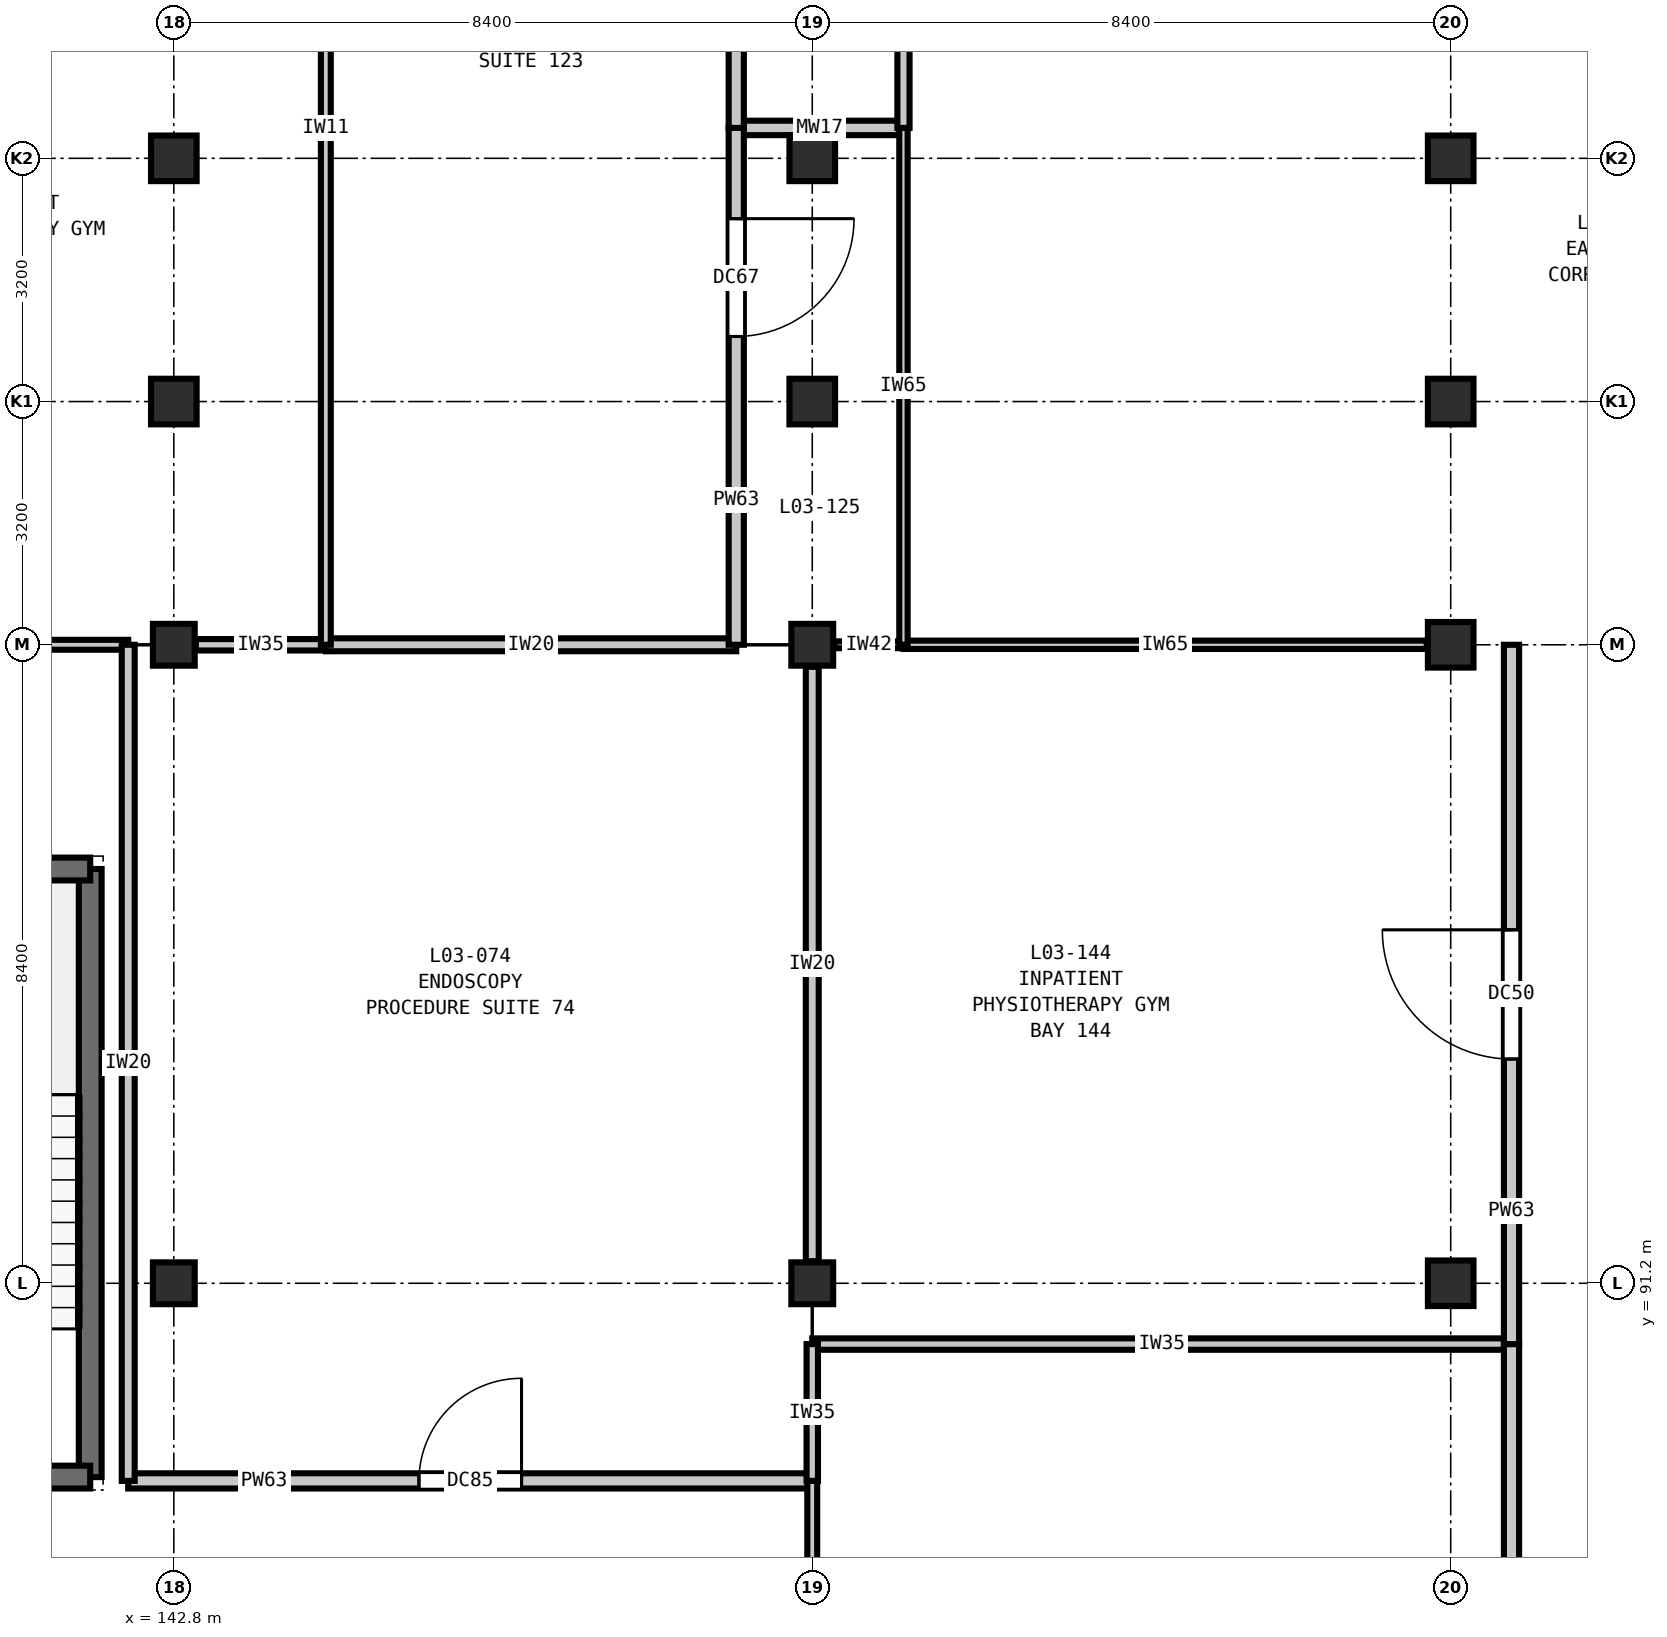
"""IFC4 building model, lengths in metres.
Left out: names, types, materials, properties, quantities, classifications, styles, units other than length and angle.
Written with IfcOpenShell. Run it as: python <this file> out.ifc"""

import sys

from ifc_helpers import new_model, si_unit, direction, frame, frame_2d, origin, origin_2d, place, context, subcontext, project, spatial, rectangle, extrude, element, fill, save


model = new_model("IFC4")
c1 = context("Model", 3, precision=1e-05, world=origin(), true_north=direction((0.0, 1.0)))
c2 = subcontext(c1, "Body", "Model", "MODEL_VIEW")
j1 = project(units=[si_unit("LENGTHUNIT", "METRE"), si_unit("PLANEANGLEUNIT", "RADIAN")], contexts=[c1])
p1 = place(None, origin())
s1 = spatial("IfcSite", under=j1, at=p1, CompositionType="ELEMENT")
p2 = place(p1, origin())
s2 = spatial("IfcBuilding", under=s1, at=p2, CompositionType="ELEMENT")
p3 = place(p2, frame((0.0, 0.0, 16.2)))
s3 = spatial("IfcBuildingStorey", under=s2, at=p3, CompositionType="ELEMENT", Elevation=16.2)
for number, where, z_axis, x_axis in (
    (1, (142.8, 91.2, 0.0), (0.0, 0.0, 1.0), (1.0, 0.0, 0.0)),
    (2, (142.8, 99.6, 0.0), (0.0, 0.0, 1.0), (1.0, 0.0, 0.0)),
):
    element("IfcColumn", number, at=place(p3, frame(where, z_axis=z_axis, x_axis=x_axis)), inside=s3, PredefinedType="COLUMN", context=c2, shape_type="SweptSolid", body=[
        extrude(rectangle(XDim=0.55, YDim=0.55, at=origin_2d()), origin(), (0.0, 0.0, 1.0), 4.2),
    ])
for number, where, z_axis, x_axis in (
    (3, (142.8, 102.8, 0.0), (0.0, 0.0, 1.0), (1.0, 0.0, 0.0)),
    (4, (142.8, 106.0, 0.0), (0.0, 0.0, 1.0), (1.0, 0.0, 0.0)),
):
    element("IfcColumn", number, at=place(p3, frame(where, z_axis=z_axis, x_axis=x_axis)), inside=s3, PredefinedType="COLUMN", context=c2, shape_type="SweptSolid", body=[
        extrude(rectangle(XDim=0.6, YDim=0.6, at=origin_2d()), origin(), (0.0, 0.0, 1.0), 4.2),
    ])
for number, where, z_axis, x_axis in (
    (5, (151.2, 91.2, 0.0), (0.0, 0.0, 1.0), (1.0, 0.0, 0.0)),
    (6, (151.2, 99.6, 0.0), (0.0, 0.0, 1.0), (1.0, 0.0, 0.0)),
):
    element("IfcColumn", number, at=place(p3, frame(where, z_axis=z_axis, x_axis=x_axis)), inside=s3, PredefinedType="COLUMN", context=c2, shape_type="SweptSolid", body=[
        extrude(rectangle(XDim=0.55, YDim=0.55, at=origin_2d()), origin(), (0.0, 0.0, 1.0), 4.2),
    ])
for number, where, z_axis, x_axis in (
    (7, (151.2, 102.8, 0.0), (0.0, 0.0, 1.0), (1.0, 0.0, 0.0)),
    (8, (151.2, 106.0, 0.0), (0.0, 0.0, 1.0), (1.0, 0.0, 0.0)),
    (9, (159.6, 91.2, 0.0), (0.0, 0.0, 1.0), (1.0, 0.0, 0.0)),
    (10, (159.6, 99.6, 0.0), (0.0, 0.0, 1.0), (1.0, 0.0, 0.0)),
    (11, (159.6, 102.8, 0.0), (0.0, 0.0, 1.0), (1.0, 0.0, 0.0)),
    (12, (159.6, 106.0, 0.0), (0.0, 0.0, 1.0), (1.0, 0.0, 0.0)),
):
    element("IfcColumn", number, at=place(p3, frame(where, z_axis=z_axis, x_axis=x_axis)), inside=s3, PredefinedType="COLUMN", context=c2, shape_type="SweptSolid", body=[
        extrude(rectangle(XDim=0.6, YDim=0.6, at=origin_2d()), origin(), (0.0, 0.0, 1.0), 4.2),
    ])
p4 = place(p3, frame((141.7, 88.65, 0.0), z_axis=(0.0, 0.0, 1.0), x_axis=(0.0, 1.0, 0.0)))
e13 = element("IfcWall", 13, at=p4, inside=s3, PredefinedType="SHEAR", context=c2, shape_type="SweptSolid", body=[
    extrude(rectangle(XDim=8.0, YDim=0.3, at=frame_2d((4.0, 0.0))), origin(), (0.0, 0.0, 1.0), 4.2),
])
p5 = place(p3, frame((141.7, 96.65, 0.0), z_axis=(0.0, 0.0, 1.0), x_axis=(-1.0, 0.0, 0.0)))
e14 = element("IfcWall", 14, at=p5, inside=s3, PredefinedType="SHEAR", context=c2, shape_type="SweptSolid", body=[
    extrude(rectangle(XDim=4.1, YDim=0.3, at=frame_2d((2.05, 0.0))), origin(), (0.0, 0.0, 1.0), 4.2),
])
p6 = place(p3, frame((137.6, 88.65, 0.0), z_axis=(0.0, 0.0, 1.0), x_axis=(1.0, 0.0, 0.0)))
e15 = element("IfcWall", 15, at=p6, inside=s3, PredefinedType="SHEAR", context=c2, shape_type="SweptSolid", body=[
    extrude(rectangle(XDim=4.1, YDim=0.3, at=frame_2d((2.05, 0.0))), origin(), (0.0, 0.0, 1.0), 4.2),
])
p7 = place(p6, frame((1.3, 0.0, 0.0)))
e16 = element("IfcOpeningElement", 16, at=p7, cuts=e15, PredefinedType="OPENING", context=c2, shape_type="SweptSolid", body=[
    extrude(rectangle(XDim=1.5, YDim=2.2, at=frame_2d((0.75, 1.1))), frame((0.0, 0.16, 0.0), z_axis=(0.0, -1.0, 0.0), x_axis=(1.0, 0.0, 0.0)), (0.0, 0.0, 1.0), 0.32),
])
p8 = place(p3, frame((142.2, 88.6, 0.0), z_axis=(0.0, 0.0, 1.0), x_axis=(1.0, 0.0, 0.0)))
e17 = element("IfcWall", 17, at=p8, inside=s3, PredefinedType="PARTITIONING", context=c2, shape_type="SweptSolid", body=[
    extrude(rectangle(XDim=9.0, YDim=0.2, at=frame_2d((4.5, 0.0))), origin(), (0.0, 0.0, 1.0), 3.89),
])
p9 = place(p8, frame((3.825, 0.0, 0.0)))
e18 = element("IfcOpeningElement", 18, at=p9, cuts=e17, PredefinedType="OPENING", context=c2, shape_type="SweptSolid", body=[
    extrude(rectangle(XDim=1.35, YDim=2.2, at=frame_2d((0.675, 1.1))), frame((0.0, 0.11, 0.0), z_axis=(0.0, -1.0, 0.0), x_axis=(1.0, 0.0, 0.0)), (0.0, 0.0, 1.0), 0.22),
])
p10 = place(p3, frame((151.2, 90.4, 0.0), z_axis=(0.0, 0.0, 1.0), x_axis=(1.0, 0.0, 0.0)))
e19 = element("IfcWall", 19, at=p10, inside=s3, PredefinedType="PARTITIONING", context=c2, shape_type="SweptSolid", body=[
    extrude(rectangle(XDim=9.2, YDim=0.15, at=frame_2d((4.6, 0.0))), origin(), (0.0, 0.0, 1.0), 3.89),
])
p11 = place(p3, frame((136.4, 99.6, 0.0), z_axis=(0.0, 0.0, 1.0), x_axis=(1.0, 0.0, 0.0)))
e20 = element("IfcWall", 20, at=p11, inside=s3, PredefinedType="PARTITIONING", context=c2, shape_type="SweptSolid", body=[
    extrude(rectangle(XDim=5.8, YDim=0.13, at=frame_2d((2.9, 0.0))), origin(), (0.0, 0.0, 1.0), 3.535),
])
p12 = place(p3, frame((143.09, 99.6, 0.0), z_axis=(0.0, 0.0, 1.0), x_axis=(1.0, 0.0, 0.0)))
e21 = element("IfcWall", 21, at=p12, inside=s3, PredefinedType="PARTITIONING", context=c2, shape_type="SweptSolid", body=[
    extrude(rectangle(XDim=1.71, YDim=0.15, at=frame_2d((0.855, 0.0))), origin(), (0.0, 0.0, 1.0), 3.535),
])
p13 = place(p3, frame((144.8, 99.6, 0.0), z_axis=(0.0, 0.0, 1.0), x_axis=(1.0, 0.0, 0.0)))
e22 = element("IfcWall", 22, at=p13, inside=s3, PredefinedType="PARTITIONING", context=c2, shape_type="SweptSolid", body=[
    extrude(rectangle(XDim=5.4, YDim=0.17, at=frame_2d((2.7, 0.0))), origin(), (0.0, 0.0, 1.0), 3.535),
])
p14 = place(p3, frame((151.49, 99.6, 0.0), z_axis=(0.0, 0.0, 1.0), x_axis=(1.0, 0.0, 0.0)))
e23 = element("IfcWall", 23, at=p14, inside=s3, PredefinedType="PARTITIONING", context=c2, shape_type="SweptSolid", body=[
    extrude(rectangle(XDim=0.91, YDim=0.09, at=frame_2d((0.455, 0.0))), origin(), (0.0, 0.0, 1.0), 3.535),
])
p15 = place(p3, frame((152.4, 99.6, 0.0), z_axis=(0.0, 0.0, 1.0), x_axis=(1.0, 0.0, 0.0)))
e24 = element("IfcWall", 24, at=p15, inside=s3, PredefinedType="PARTITIONING", context=c2, shape_type="SweptSolid", body=[
    extrude(rectangle(XDim=6.885, YDim=0.11, at=frame_2d((3.442, 0.0))), origin(), (0.0, 0.0, 1.0), 3.535),
])
p16 = place(p3, frame((150.2, 106.4, 0.0), z_axis=(0.0, 0.0, 1.0), x_axis=(1.0, 0.0, 0.0)))
e25 = element("IfcWall", 25, at=p16, inside=s3, PredefinedType="PLUMBINGWALL", context=c2, shape_type="SweptSolid", body=[
    extrude(rectangle(XDim=2.2, YDim=0.19, at=frame_2d((1.1, 0.0))), origin(), (0.0, 0.0, 1.0), 3.89),
])
p17 = place(p3, frame((142.2, 88.6, 0.0), z_axis=(0.0, 0.0, 1.0), x_axis=(0.0, 1.0, 0.0)))
e26 = element("IfcWall", 26, at=p17, inside=s3, PredefinedType="PARTITIONING", context=c2, shape_type="SweptSolid", body=[
    extrude(rectangle(XDim=11.0, YDim=0.17, at=frame_2d((5.5, 0.0))), origin(), (0.0, 0.0, 1.0), 3.89),
])
p18 = place(p3, frame((144.8, 99.6, 0.0), z_axis=(0.0, 0.0, 1.0), x_axis=(0.0, 1.0, 0.0)))
e27 = element("IfcWall", 27, at=p18, inside=s3, PredefinedType="PARTITIONING", context=c2, shape_type="SweptSolid", body=[
    extrude(rectangle(XDim=13.6, YDim=0.13, at=frame_2d((6.8, 0.0))), origin(), (0.0, 0.0, 1.0), 3.89),
])
p19 = place(p3, frame((150.2, 99.6, 0.0), z_axis=(0.0, 0.0, 1.0), x_axis=(0.0, 1.0, 0.0)))
e28 = element("IfcWall", 28, at=p19, inside=s3, PredefinedType="PARTITIONING", context=c2, shape_type="SweptSolid", body=[
    extrude(rectangle(XDim=6.8, YDim=0.2, at=frame_2d((3.4, 0.0))), origin(), (0.0, 0.0, 1.0), 3.89),
])
p20 = place(p19, frame((4.056, 0.0, 0.0)))
e29 = element("IfcOpeningElement", 29, at=p20, cuts=e28, PredefinedType="OPENING", context=c2, shape_type="SweptSolid", body=[
    extrude(rectangle(XDim=1.55, YDim=2.25, at=frame_2d((0.775, 1.125))), frame((0.0, 0.11, 0.0), z_axis=(0.0, -1.0, 0.0), x_axis=(1.0, 0.0, 0.0)), (0.0, 0.0, 1.0), 0.22),
])
p21 = place(p3, frame((150.2, 106.4, 0.0), z_axis=(0.0, 0.0, 1.0), x_axis=(0.0, 1.0, 0.0)))
e30 = element("IfcWall", 30, at=p21, inside=s3, PredefinedType="PARTITIONING", context=c2, shape_type="SweptSolid", body=[
    extrude(rectangle(XDim=6.8, YDim=0.2, at=frame_2d((3.4, 0.0))), origin(), (0.0, 0.0, 1.0), 3.89),
])
p22 = place(p21, frame((3.912, 0.0, 0.0)))
e31 = element("IfcOpeningElement", 31, at=p22, cuts=e30, PredefinedType="OPENING", context=c2, shape_type="SweptSolid", body=[
    extrude(rectangle(XDim=0.92, YDim=2.1, at=frame_2d((0.46, 1.05))), frame((0.0, 0.11, 0.0), z_axis=(0.0, -1.0, 0.0), x_axis=(1.0, 0.0, 0.0)), (0.0, 0.0, 1.0), 0.22),
])
p23 = place(p3, frame((151.2, 85.8, 0.0), z_axis=(0.0, 0.0, 1.0), x_axis=(0.0, 1.0, 0.0)))
e32 = element("IfcWall", 32, at=p23, inside=s3, PredefinedType="PARTITIONING", context=c2, shape_type="SweptSolid", body=[
    extrude(rectangle(XDim=2.8, YDim=0.13, at=frame_2d((1.4, 0.0))), origin(), (0.0, 0.0, 1.0), 3.585),
])
p24 = place(p3, frame((151.2, 88.6, 0.0), z_axis=(0.0, 0.0, 1.0), x_axis=(0.0, 1.0, 0.0)))
e33 = element("IfcWall", 33, at=p24, inside=s3, PredefinedType="PARTITIONING", context=c2, shape_type="SweptSolid", body=[
    extrude(rectangle(XDim=1.8, YDim=0.15, at=frame_2d((0.9, 0.0))), origin(), (0.0, 0.0, 1.0), 3.585),
])
p25 = place(p3, frame((151.2, 91.49, 0.0), z_axis=(0.0, 0.0, 1.0), x_axis=(0.0, 1.0, 0.0)))
e34 = element("IfcWall", 34, at=p25, inside=s3, PredefinedType="PARTITIONING", context=c2, shape_type="SweptSolid", body=[
    extrude(rectangle(XDim=7.82, YDim=0.17, at=frame_2d((3.91, 0.0))), origin(), (0.0, 0.0, 1.0), 3.585),
])
p26 = place(p3, frame((152.4, 99.6, 0.0), z_axis=(0.0, 0.0, 1.0), x_axis=(0.0, 1.0, 0.0)))
e35 = element("IfcWall", 35, at=p26, inside=s3, PredefinedType="PARTITIONING", context=c2, shape_type="SweptSolid", body=[
    extrude(rectangle(XDim=6.8, YDim=0.11, at=frame_2d((3.4, 0.0))), origin(), (0.0, 0.0, 1.0), 3.89),
])
p27 = place(p3, frame((152.4, 106.4, 0.0), z_axis=(0.0, 0.0, 1.0), x_axis=(0.0, 1.0, 0.0)))
e36 = element("IfcWall", 36, at=p27, inside=s3, PredefinedType="PLUMBINGWALL", context=c2, shape_type="SweptSolid", body=[
    extrude(rectangle(XDim=6.8, YDim=0.16, at=frame_2d((3.4, 0.0))), origin(), (0.0, 0.0, 1.0), 3.89),
])
p28 = place(p3, frame((160.4, 82.8, 0.0), z_axis=(0.0, 0.0, 1.0), x_axis=(0.0, 1.0, 0.0)))
e37 = element("IfcWall", 37, at=p28, inside=s3, PredefinedType="PARTITIONING", context=c2, shape_type="SweptSolid", body=[
    extrude(rectangle(XDim=7.6, YDim=0.2, at=frame_2d((3.8, 0.0))), origin(), (0.0, 0.0, 1.0), 3.89),
])
p29 = place(p28, frame((3.025, 0.0, 0.0)))
e38 = element("IfcOpeningElement", 38, at=p29, cuts=e37, PredefinedType="OPENING", context=c2, shape_type="SweptSolid", body=[
    extrude(rectangle(XDim=1.55, YDim=2.25, at=frame_2d((0.775, 1.125))), frame((0.0, 0.11, 0.0), z_axis=(0.0, -1.0, 0.0), x_axis=(1.0, 0.0, 0.0)), (0.0, 0.0, 1.0), 0.22),
])
p30 = place(p3, frame((160.4, 90.4, 0.0), z_axis=(0.0, 0.0, 1.0), x_axis=(0.0, 1.0, 0.0)))
e39 = element("IfcWall", 39, at=p30, inside=s3, PredefinedType="PARTITIONING", context=c2, shape_type="SweptSolid", body=[
    extrude(rectangle(XDim=9.2, YDim=0.2, at=frame_2d((4.6, 0.0))), origin(), (0.0, 0.0, 1.0), 3.89),
])
p31 = place(p30, frame((3.75, 0.0, 0.0)))
e40 = element("IfcOpeningElement", 40, at=p31, cuts=e39, PredefinedType="OPENING", context=c2, shape_type="SweptSolid", body=[
    extrude(rectangle(XDim=1.7, YDim=2.3, at=frame_2d((0.85, 1.15))), frame((0.0, 0.11, 0.0), z_axis=(0.0, -1.0, 0.0), x_axis=(1.0, 0.0, 0.0)), (0.0, 0.0, 1.0), 0.22),
])
p32 = place(p9, origin())
e41 = element("IfcDoor", 41, at=p32, inside=s3, OperationType="SINGLE_SWING_RIGHT", PredefinedType="DOOR", context=c2, shape_type="SweptSolid", body=[
    extrude(rectangle(XDim=1.35, YDim=2.2, at=frame_2d((0.675, 1.1))), frame((0.0, 0.025, 0.0), z_axis=(0.0, -1.0, 0.0), x_axis=(1.0, 0.0, 0.0)), (0.0, 0.0, 1.0), 0.05),
])
fill(e18, e41)
p33 = place(p20, frame((1.55, 0.0, 0.0), z_axis=(0.0, 0.0, 1.0), x_axis=(-1.0, 0.0, 0.0)))
e42 = element("IfcDoor", 42, at=p33, inside=s3, OperationType="SINGLE_SWING_LEFT", PredefinedType="DOOR", context=c2, shape_type="SweptSolid", body=[
    extrude(rectangle(XDim=1.55, YDim=2.25, at=frame_2d((0.775, 1.125))), frame((0.0, 0.025, 0.0), z_axis=(0.0, -1.0, 0.0), x_axis=(1.0, 0.0, 0.0)), (0.0, 0.0, 1.0), 0.05),
])
fill(e29, e42)
p34 = place(p31, origin())
e43 = element("IfcDoor", 43, at=p34, inside=s3, OperationType="SINGLE_SWING_RIGHT", PredefinedType="DOOR", context=c2, shape_type="SweptSolid", body=[
    extrude(rectangle(XDim=1.7, YDim=2.3, at=frame_2d((0.85, 1.15))), frame((0.0, 0.025, 0.0), z_axis=(0.0, -1.0, 0.0), x_axis=(1.0, 0.0, 0.0)), (0.0, 0.0, 1.0), 0.05),
])
fill(e40, e43)
save(model, sys.argv[1])
